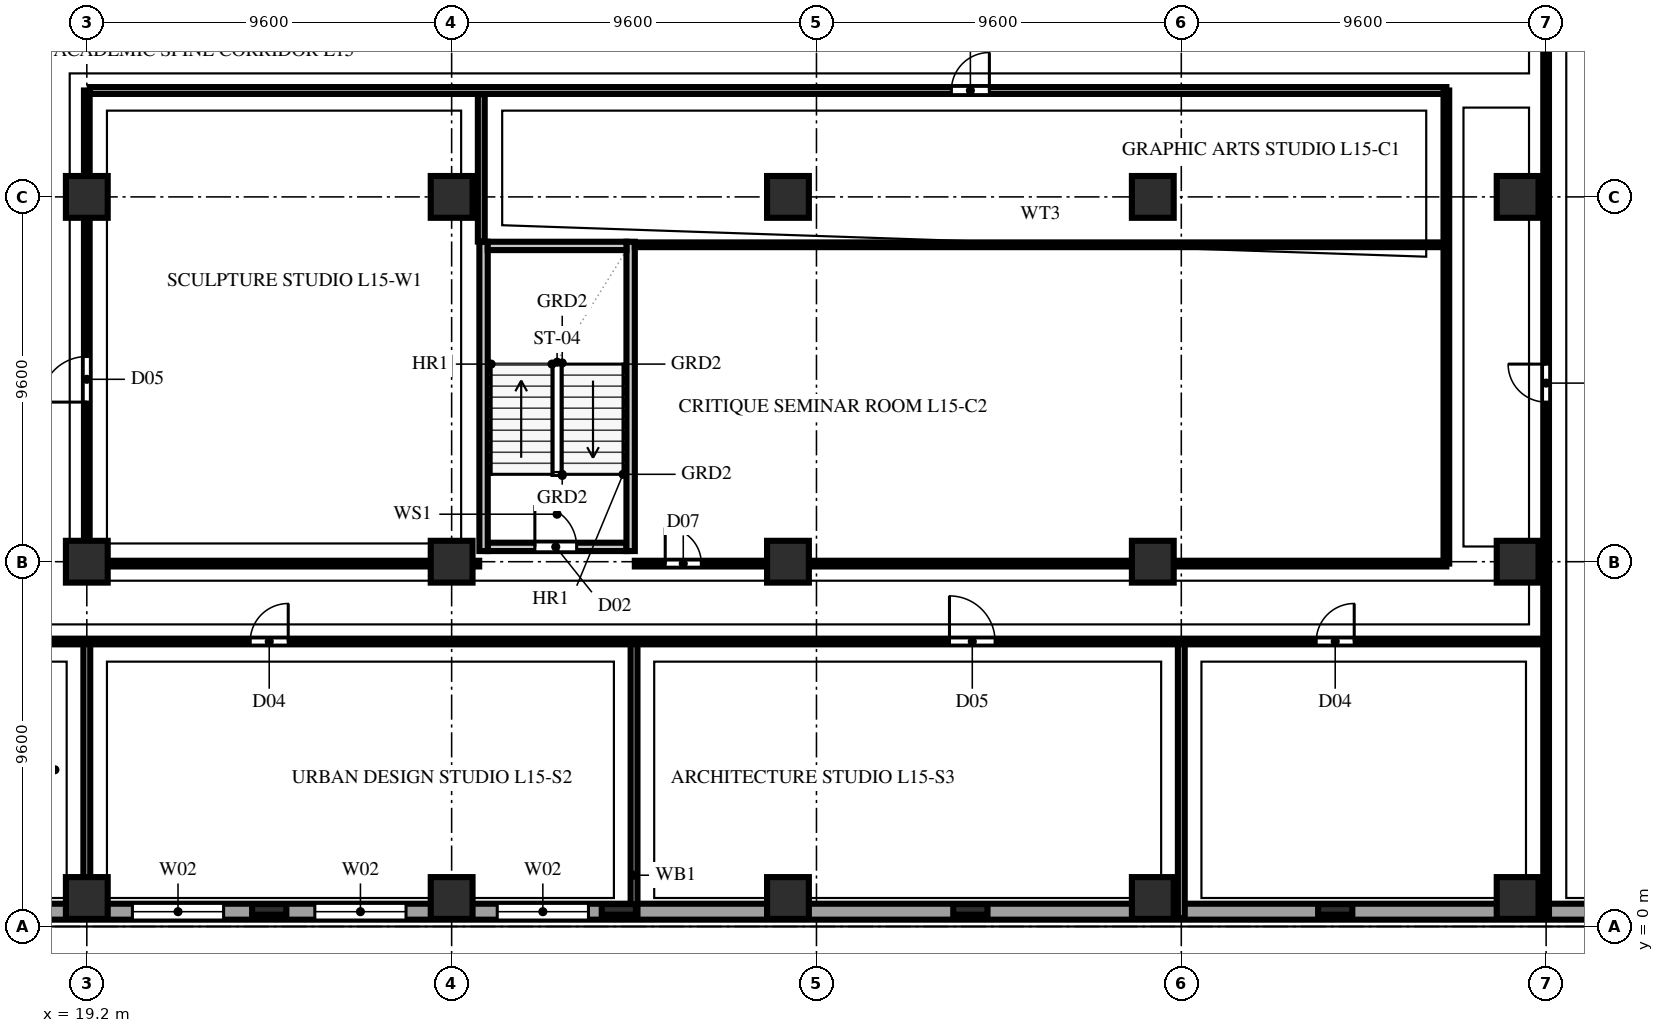
"""IFC4 building model, lengths in metres.
Left out: names, types, materials, properties, quantities, classifications, styles, units other than length and angle.
Written with IfcOpenShell. Run it as: python <this file> out.ifc"""

import sys

from ifc_helpers import new_model, si_unit, direction, frame, frame_2d, origin, origin_2d, place, context, subcontext, project, spatial, rectangle, extrude, element, fill, save


model = new_model("IFC4")
c1 = context("Model", 3, precision=1e-05, world=origin(), true_north=direction((0.0, 1.0)))
c2 = subcontext(c1, "Body", "Model", "MODEL_VIEW")
j1 = project(units=[si_unit("LENGTHUNIT", "METRE"), si_unit("PLANEANGLEUNIT", "RADIAN")], contexts=[c1])
p1 = place(None, origin())
s1 = spatial("IfcSite", under=j1, at=p1, CompositionType="ELEMENT")
p2 = place(p1, origin())
s2 = spatial("IfcBuilding", under=s1, at=p2, CompositionType="ELEMENT")
p3 = place(p2, frame((0.0, 0.0, 62.2)))
s3 = spatial("IfcBuildingStorey", under=s2, at=p3, CompositionType="ELEMENT", Elevation=62.2)
for number, where, z_axis, x_axis in (
    (1, (19.2, 0.75, 0.0), (0.0, 0.0, 1.0), (1.0, 0.0, 0.0)),
    (2, (19.2, 9.6, 0.0), (0.0, 0.0, 1.0), (1.0, 0.0, 0.0)),
    (3, (19.2, 19.2, 0.0), (0.0, 0.0, 1.0), (1.0, 0.0, 0.0)),
    (4, (28.8, 0.75, 0.0), (0.0, 0.0, 1.0), (1.0, 0.0, 0.0)),
    (5, (28.8, 9.6, 0.0), (0.0, 0.0, 1.0), (1.0, 0.0, 0.0)),
    (6, (28.8, 19.2, 0.0), (0.0, 0.0, 1.0), (1.0, 0.0, 0.0)),
    (7, (37.65, 0.75, 0.0), (0.0, 0.0, 1.0), (1.0, 0.0, 0.0)),
    (8, (37.65, 9.6, 0.0), (0.0, 0.0, 1.0), (1.0, 0.0, 0.0)),
    (9, (37.65, 19.2, 0.0), (0.0, 0.0, 1.0), (1.0, 0.0, 0.0)),
    (10, (47.25, 0.75, 0.0), (0.0, 0.0, 1.0), (1.0, 0.0, 0.0)),
    (11, (47.25, 9.6, 0.0), (0.0, 0.0, 1.0), (1.0, 0.0, 0.0)),
    (12, (47.25, 19.2, 0.0), (0.0, 0.0, 1.0), (1.0, 0.0, 0.0)),
    (13, (56.85, 0.75, 0.0), (0.0, 0.0, 1.0), (1.0, 0.0, 0.0)),
    (14, (56.85, 9.6, 0.0), (0.0, 0.0, 1.0), (1.0, 0.0, 0.0)),
    (15, (56.85, 19.2, 0.0), (0.0, 0.0, 1.0), (1.0, 0.0, 0.0)),
):
    element("IfcColumn", number, at=place(p3, frame(where, z_axis=z_axis, x_axis=x_axis)), inside=s3, PredefinedType="COLUMN", context=c2, shape_type="SweptSolid", body=[
        extrude(rectangle(XDim=1.1, YDim=1.1, at=origin_2d()), origin(), (0.0, 0.0, 1.0), 3.8),
    ])
for number, where, z_axis, x_axis in (
    (16, (24.0, 0.45, 0.0), (0.0, 0.0, 1.0), (1.0, 0.0, 0.0)),
    (17, (33.2, 0.45, 0.0), (0.0, 0.0, 1.0), (1.0, 0.0, 0.0)),
    (18, (42.45, 0.45, 0.0), (0.0, 0.0, 1.0), (1.0, 0.0, 0.0)),
    (19, (52.05, 0.45, 0.0), (0.0, 0.0, 1.0), (1.0, 0.0, 0.0)),
):
    element("IfcColumn", number, at=place(p3, frame(where, z_axis=z_axis, x_axis=x_axis)), inside=s3, PredefinedType="PILASTER", context=c2, shape_type="SweptSolid", body=[
        extrude(rectangle(XDim=0.9, YDim=0.28, at=origin_2d()), origin(), (0.0, 0.0, 1.0), 3.8),
    ])
p4 = place(p3, frame((1.84, 0.39, 0.0), z_axis=(0.0, 0.0, 1.0), x_axis=(1.0, 0.0, 0.0)))
e20 = element("IfcWall", 20, at=p4, inside=s3, PredefinedType="SOLIDWALL", context=c2, shape_type="SweptSolid", body=[
    extrude(rectangle(XDim=63.52, YDim=0.42, at=frame_2d((31.76, 0.0))), origin(), (0.0, 0.0, 1.0), 3.54),
])
p5 = place(p4, frame((4.16, 0.0, 0.85)))
e21 = element("IfcOpeningElement", 21, at=p5, cuts=e20, PredefinedType="OPENING", context=c2, shape_type="SweptSolid", body=[
    extrude(rectangle(XDim=2.4, YDim=1.85, at=frame_2d((1.2, 0.925))), frame((0.0, 0.222, 0.0), z_axis=(0.0, -1.0, 0.0), x_axis=(1.0, 0.0, 0.0)), (0.0, 0.0, 1.0), 0.444),
])
p6 = place(p4, frame((8.96, 0.0, 0.85)))
e22 = element("IfcOpeningElement", 22, at=p6, cuts=e20, PredefinedType="OPENING", context=c2, shape_type="SweptSolid", body=[
    extrude(rectangle(XDim=2.4, YDim=1.85, at=frame_2d((1.2, 0.925))), frame((0.0, 0.222, 0.0), z_axis=(0.0, -1.0, 0.0), x_axis=(1.0, 0.0, 0.0)), (0.0, 0.0, 1.0), 0.444),
])
p7 = place(p4, frame((13.76, 0.0, 0.85)))
e23 = element("IfcOpeningElement", 23, at=p7, cuts=e20, PredefinedType="OPENING", context=c2, shape_type="SweptSolid", body=[
    extrude(rectangle(XDim=2.4, YDim=1.85, at=frame_2d((1.2, 0.925))), frame((0.0, 0.222, 0.0), z_axis=(0.0, -1.0, 0.0), x_axis=(1.0, 0.0, 0.0)), (0.0, 0.0, 1.0), 0.444),
])
p8 = place(p4, frame((18.56, 0.0, 0.85)))
e24 = element("IfcOpeningElement", 24, at=p8, cuts=e20, PredefinedType="OPENING", context=c2, shape_type="SweptSolid", body=[
    extrude(rectangle(XDim=2.4, YDim=1.85, at=frame_2d((1.2, 0.925))), frame((0.0, 0.222, 0.0), z_axis=(0.0, -1.0, 0.0), x_axis=(1.0, 0.0, 0.0)), (0.0, 0.0, 1.0), 0.444),
])
p9 = place(p4, frame((23.36, 0.0, 0.85)))
e25 = element("IfcOpeningElement", 25, at=p9, cuts=e20, PredefinedType="OPENING", context=c2, shape_type="SweptSolid", body=[
    extrude(rectangle(XDim=2.4, YDim=1.85, at=frame_2d((1.2, 0.925))), frame((0.0, 0.222, 0.0), z_axis=(0.0, -1.0, 0.0), x_axis=(1.0, 0.0, 0.0)), (0.0, 0.0, 1.0), 0.444),
])
p10 = place(p4, frame((28.16, 0.0, 0.85)))
e26 = element("IfcOpeningElement", 26, at=p10, cuts=e20, PredefinedType="OPENING", context=c2, shape_type="SweptSolid", body=[
    extrude(rectangle(XDim=2.4, YDim=1.85, at=frame_2d((1.2, 0.925))), frame((0.0, 0.222, 0.0), z_axis=(0.0, -1.0, 0.0), x_axis=(1.0, 0.0, 0.0)), (0.0, 0.0, 1.0), 0.444),
])
p11 = place(p3, frame((29.75, 9.99, 0.0), z_axis=(0.0, 0.0, 1.0), x_axis=(1.0, 0.0, 0.0)))
e27 = element("IfcWall", 27, at=p11, inside=s3, PredefinedType="SOLIDWALL", context=c2, shape_type="SweptSolid", body=[
    extrude(rectangle(XDim=3.65, YDim=0.22, at=frame_2d((1.825, 0.0))), origin(), (0.0, 0.0, 1.0), 3.54),
])
p12 = place(p11, frame((1.24, 0.0, 0.0)))
e28 = element("IfcOpeningElement", 28, at=p12, cuts=e27, PredefinedType="OPENING", context=c2, shape_type="SweptSolid", body=[
    extrude(rectangle(XDim=1.1, YDim=2.2, at=frame_2d((0.55, 1.1))), frame((0.0, 0.122, 0.0), z_axis=(0.0, -1.0, 0.0), x_axis=(1.0, 0.0, 0.0)), (0.0, 0.0, 1.0), 0.244),
])
for number, where, z_axis, x_axis in (
    (29, (29.64, 9.88, 0.0), (0.0, 0.0, 1.0), (0.0, 1.0, 0.0)),
    (30, (33.51, 9.88, 0.0), (0.0, 0.0, 1.0), (0.0, 1.0, 0.0)),
):
    element("IfcWall", number, at=place(p3, frame(where, z_axis=z_axis, x_axis=x_axis)), inside=s3, PredefinedType="SOLIDWALL", context=c2, shape_type="SweptSolid", body=[
        extrude(rectangle(XDim=8.14, YDim=0.22, at=frame_2d((4.07, 0.0))), origin(), (0.0, 0.0, 1.0), 3.54),
    ])
p13 = place(p3, frame((29.75, 17.91, 0.0), z_axis=(0.0, 0.0, 1.0), x_axis=(1.0, 0.0, 0.0)))
e31 = element("IfcWall", 31, at=p13, inside=s3, PredefinedType="SOLIDWALL", context=c2, shape_type="SweptSolid", body=[
    extrude(rectangle(XDim=3.65, YDim=0.22, at=frame_2d((1.825, 0.0))), origin(), (0.0, 0.0, 1.0), 3.54),
])
p14 = place(p3, frame((19.2, 0.22, 0.0), z_axis=(0.0, 0.0, 1.0), x_axis=(0.0, 1.0, 0.0)))
e32 = element("IfcWall", 32, at=p14, inside=s3, PredefinedType="PARTITIONING", context=c2, shape_type="SweptSolid", body=[
    extrude(rectangle(XDim=0.53, YDim=0.18, at=frame_2d((0.265, 0.0))), origin(), (0.0, 0.0, 1.0), 3.54),
])
p15 = place(p3, frame((19.2, 0.75, 0.0), z_axis=(0.0, 0.0, 1.0), x_axis=(0.0, 1.0, 0.0)))
e33 = element("IfcWall", 33, at=p15, inside=s3, PredefinedType="PARTITIONING", context=c2, shape_type="SweptSolid", body=[
    extrude(rectangle(XDim=6.75, YDim=0.18, at=frame_2d((3.375, 0.0))), origin(), (0.0, 0.0, 1.0), 2.923),
])
for number, where, z_axis, x_axis in (
    (34, (33.6, 0.22, 0.0), (0.0, 0.0, 1.0), (0.0, 1.0, 0.0)),
    (35, (48.0, 0.22, 0.0), (0.0, 0.0, 1.0), (0.0, 1.0, 0.0)),
):
    element("IfcWall", number, at=place(p3, frame(where, z_axis=z_axis, x_axis=x_axis)), inside=s3, PredefinedType="PARTITIONING", context=c2, shape_type="SweptSolid", body=[
        extrude(rectangle(XDim=7.28, YDim=0.18, at=frame_2d((3.64, 0.0))), origin(), (0.0, 0.0, 1.0), 3.54),
    ])
p16 = place(p3, frame((0.22, 7.5, 0.0), z_axis=(0.0, 0.0, 1.0), x_axis=(1.0, 0.0, 0.0)))
e36 = element("IfcWall", 36, at=p16, inside=s3, PredefinedType="PARTITIONING", context=c2, shape_type="SweptSolid", body=[
    extrude(rectangle(XDim=57.38, YDim=0.15, at=frame_2d((28.69, 0.0))), origin(), (0.0, 0.0, 1.0), 3.54),
])
p17 = place(p16, frame((13.68, 0.0, 0.0)))
e37 = element("IfcOpeningElement", 37, at=p17, cuts=e36, PredefinedType="OPENING", context=c2, shape_type="SweptSolid", body=[
    extrude(rectangle(XDim=1.0, YDim=2.2, at=frame_2d((0.5, 1.1))), frame((0.0, 0.087, 0.0), z_axis=(0.0, -1.0, 0.0), x_axis=(1.0, 0.0, 0.0)), (0.0, 0.0, 1.0), 0.174),
])
p18 = place(p16, frame((23.28, 0.0, 0.0)))
e38 = element("IfcOpeningElement", 38, at=p18, cuts=e36, PredefinedType="OPENING", context=c2, shape_type="SweptSolid", body=[
    extrude(rectangle(XDim=1.0, YDim=2.2, at=frame_2d((0.5, 1.1))), frame((0.0, 0.087, 0.0), z_axis=(0.0, -1.0, 0.0), x_axis=(1.0, 0.0, 0.0)), (0.0, 0.0, 1.0), 0.174),
])
p19 = place(p16, frame((41.68, 0.0, 0.0)))
e39 = element("IfcOpeningElement", 39, at=p19, cuts=e36, PredefinedType="OPENING", context=c2, shape_type="SweptSolid", body=[
    extrude(rectangle(XDim=1.2, YDim=2.2, at=frame_2d((0.6, 1.1))), frame((0.0, 0.087, 0.0), z_axis=(0.0, -1.0, 0.0), x_axis=(1.0, 0.0, 0.0)), (0.0, 0.0, 1.0), 0.174),
])
p20 = place(p16, frame((51.33, 0.0, 0.0)))
e40 = element("IfcOpeningElement", 40, at=p20, cuts=e36, PredefinedType="OPENING", context=c2, shape_type="SweptSolid", body=[
    extrude(rectangle(XDim=1.0, YDim=2.2, at=frame_2d((0.5, 1.1))), frame((0.0, 0.087, 0.0), z_axis=(0.0, -1.0, 0.0), x_axis=(1.0, 0.0, 0.0)), (0.0, 0.0, 1.0), 0.174),
])
p21 = place(p3, frame((57.6, 0.22, 0.0), z_axis=(0.0, 0.0, 1.0), x_axis=(0.0, 1.0, 0.0)))
e41 = element("IfcWall", 41, at=p21, inside=s3, PredefinedType="PARTITIONING", context=c2, shape_type="SweptSolid", body=[
    extrude(rectangle(XDim=37.96, YDim=0.15, at=frame_2d((18.98, 0.0))), origin(), (0.0, 0.0, 1.0), 3.54),
])
p22 = place(p21, frame((13.58, 0.0, 0.0)))
e42 = element("IfcOpeningElement", 42, at=p22, cuts=e41, PredefinedType="OPENING", context=c2, shape_type="SweptSolid", body=[
    extrude(rectangle(XDim=1.0, YDim=2.2, at=frame_2d((0.5, 1.1))), frame((0.0, 0.087, 0.0), z_axis=(0.0, -1.0, 0.0), x_axis=(1.0, 0.0, 0.0)), (0.0, 0.0, 1.0), 0.174),
])
p23 = place(p3, frame((19.2, 9.55, 0.0), z_axis=(0.0, 0.0, 1.0), x_axis=(0.0, 1.0, 0.0)))
e43 = element("IfcWall", 43, at=p23, inside=s3, PredefinedType="PARTITIONING", context=c2, shape_type="SweptSolid", body=[
    extrude(rectangle(XDim=12.45, YDim=0.15, at=frame_2d((6.225, 0.0))), origin(), (0.0, 0.0, 1.0), 2.923),
])
p24 = place(p23, frame((4.25, 0.0, 0.0)))
e44 = element("IfcOpeningElement", 44, at=p24, cuts=e43, PredefinedType="OPENING", context=c2, shape_type="SweptSolid", body=[
    extrude(rectangle(XDim=1.2, YDim=2.2, at=frame_2d((0.6, 1.1))), frame((0.0, 0.087, 0.0), z_axis=(0.0, -1.0, 0.0), x_axis=(1.0, 0.0, 0.0)), (0.0, 0.0, 1.0), 0.174),
])
p25 = place(p3, frame((29.58, 18.025, 0.0), z_axis=(0.0, 0.0, 1.0), x_axis=(0.0, 1.0, 0.0)))
e45 = element("IfcWall", 45, at=p25, inside=s3, PredefinedType="PARTITIONING", context=c2, shape_type="SweptSolid", body=[
    extrude(rectangle(XDim=3.88, YDim=0.18, at=frame_2d((1.94, 0.0))), origin(), (0.0, 0.0, 1.0), 3.54),
])
p26 = place(p3, frame((19.28, 22.0, 0.0), z_axis=(0.0, 0.0, 1.0), x_axis=(1.0, 0.0, 0.0)))
e46 = element("IfcWall", 46, at=p26, inside=s3, PredefinedType="PARTITIONING", context=c2, shape_type="SweptSolid", body=[
    extrude(rectangle(XDim=35.695, YDim=0.18, at=frame_2d((17.848, 0.0))), origin(), (0.0, 0.0, 1.0), 3.54),
])
p27 = place(p26, frame((22.67, 0.0, 0.0)))
e47 = element("IfcOpeningElement", 47, at=p27, cuts=e46, PredefinedType="OPENING", context=c2, shape_type="SweptSolid", body=[
    extrude(rectangle(XDim=1.0, YDim=2.2, at=frame_2d((0.5, 1.1))), frame((0.0, 0.102, 0.0), z_axis=(0.0, -1.0, 0.0), x_axis=(1.0, 0.0, 0.0)), (0.0, 0.0, 1.0), 0.204),
])
p28 = place(p3, frame((19.28, 9.55, 0.0), z_axis=(0.0, 0.0, 1.0), x_axis=(1.0, 0.0, 0.0)))
e48 = element("IfcWall", 48, at=p28, inside=s3, PredefinedType="PARTITIONING", context=c2, shape_type="SweptSolid", body=[
    extrude(rectangle(XDim=10.245, YDim=0.15, at=frame_2d((5.123, 0.0))), origin(), (0.0, 0.0, 1.0), 2.923),
])
p29 = place(p3, frame((33.62, 17.94, 0.0), z_axis=(0.0, 0.0, 1.0), x_axis=(1.0, 0.0, 0.0)))
e49 = element("IfcWall", 49, at=p29, inside=s3, PredefinedType="PARTITIONING", context=c2, shape_type="SweptSolid", body=[
    extrude(rectangle(XDim=21.355, YDim=0.125, at=frame_2d((10.677, 0.0))), origin(), (0.0, 0.0, 1.0), 3.54),
])
p30 = place(p3, frame((33.62, 9.55, 0.0), z_axis=(0.0, 0.0, 1.0), x_axis=(1.0, 0.0, 0.0)))
e50 = element("IfcWall", 50, at=p30, inside=s3, PredefinedType="PARTITIONING", context=c2, shape_type="SweptSolid", body=[
    extrude(rectangle(XDim=21.355, YDim=0.15, at=frame_2d((10.677, 0.0))), origin(), (0.0, 0.0, 1.0), 2.923),
])
p31 = place(p30, frame((0.8, 0.0, 0.0)))
e51 = element("IfcOpeningElement", 51, at=p31, cuts=e50, PredefinedType="OPENING", context=c2, shape_type="SweptSolid", body=[
    extrude(rectangle(XDim=0.95, YDim=2.15, at=frame_2d((0.475, 1.075))), frame((0.0, 0.087, 0.0), z_axis=(0.0, -1.0, 0.0), x_axis=(1.0, 0.0, 0.0)), (0.0, 0.0, 1.0), 0.174),
])
p32 = place(p3, frame((54.975, 9.55, 0.0), z_axis=(0.0, 0.0, 1.0), x_axis=(0.0, 1.0, 0.0)))
e52 = element("IfcWall", 52, at=p32, inside=s3, PredefinedType="PARTITIONING", context=c2, shape_type="SweptSolid", body=[
    extrude(rectangle(XDim=12.45, YDim=0.15, at=frame_2d((6.225, 0.0))), origin(), (0.0, 0.0, 1.0), 3.54),
])
p33 = place(p8, origin())
e53 = element("IfcWindow", 53, at=p33, inside=s3, PartitioningType="TRIPLE_PANEL_VERTICAL", PredefinedType="WINDOW", context=c2, shape_type="SweptSolid", body=[
    extrude(rectangle(XDim=2.4, YDim=1.85, at=frame_2d((1.2, 0.925))), frame((0.0, 0.11, 0.0), z_axis=(0.0, -1.0, 0.0), x_axis=(1.0, 0.0, 0.0)), (0.0, 0.0, 1.0), 0.06),
])
fill(e24, e53)
p34 = place(p9, origin())
e54 = element("IfcWindow", 54, at=p34, inside=s3, PartitioningType="TRIPLE_PANEL_VERTICAL", PredefinedType="WINDOW", context=c2, shape_type="SweptSolid", body=[
    extrude(rectangle(XDim=2.4, YDim=1.85, at=frame_2d((1.2, 0.925))), frame((0.0, 0.11, 0.0), z_axis=(0.0, -1.0, 0.0), x_axis=(1.0, 0.0, 0.0)), (0.0, 0.0, 1.0), 0.06),
])
fill(e25, e54)
p35 = place(p10, origin())
e55 = element("IfcWindow", 55, at=p35, inside=s3, PartitioningType="TRIPLE_PANEL_VERTICAL", PredefinedType="WINDOW", context=c2, shape_type="SweptSolid", body=[
    extrude(rectangle(XDim=2.4, YDim=1.85, at=frame_2d((1.2, 0.925))), frame((0.0, 0.11, 0.0), z_axis=(0.0, -1.0, 0.0), x_axis=(1.0, 0.0, 0.0)), (0.0, 0.0, 1.0), 0.06),
])
fill(e26, e55)
p36 = place(p12, origin())
e56 = element("IfcDoor", 56, at=p36, inside=s3, OperationType="SINGLE_SWING_LEFT", PredefinedType="DOOR", context=c2, shape_type="SweptSolid", body=[
    extrude(rectangle(XDim=1.1, YDim=2.2, at=frame_2d((0.55, 1.1))), frame((0.0, 0.025, 0.0), z_axis=(0.0, -1.0, 0.0), x_axis=(1.0, 0.0, 0.0)), (0.0, 0.0, 1.0), 0.05),
])
fill(e28, e56)
p37 = place(p18, origin())
e57 = element("IfcDoor", 57, at=p37, inside=s3, OperationType="SINGLE_SWING_RIGHT", PredefinedType="DOOR", context=c2, shape_type="SweptSolid", body=[
    extrude(rectangle(XDim=1.0, YDim=2.2, at=frame_2d((0.5, 1.1))), frame((0.0, 0.025, 0.0), z_axis=(0.0, -1.0, 0.0), x_axis=(1.0, 0.0, 0.0)), (0.0, 0.0, 1.0), 0.05),
])
fill(e38, e57)
p38 = place(p19, origin())
e58 = element("IfcDoor", 58, at=p38, inside=s3, OperationType="SINGLE_SWING_LEFT", PredefinedType="DOOR", context=c2, shape_type="SweptSolid", body=[
    extrude(rectangle(XDim=1.2, YDim=2.2, at=frame_2d((0.6, 1.1))), frame((0.0, 0.025, 0.0), z_axis=(0.0, -1.0, 0.0), x_axis=(1.0, 0.0, 0.0)), (0.0, 0.0, 1.0), 0.05),
])
fill(e39, e58)
p39 = place(p20, origin())
e59 = element("IfcDoor", 59, at=p39, inside=s3, OperationType="SINGLE_SWING_RIGHT", PredefinedType="DOOR", context=c2, shape_type="SweptSolid", body=[
    extrude(rectangle(XDim=1.0, YDim=2.2, at=frame_2d((0.5, 1.1))), frame((0.0, 0.025, 0.0), z_axis=(0.0, -1.0, 0.0), x_axis=(1.0, 0.0, 0.0)), (0.0, 0.0, 1.0), 0.05),
])
fill(e40, e59)
p40 = place(p22, origin())
e60 = element("IfcDoor", 60, at=p40, inside=s3, OperationType="SINGLE_SWING_RIGHT", PredefinedType="DOOR", context=c2, shape_type="SweptSolid", body=[
    extrude(rectangle(XDim=1.0, YDim=2.2, at=frame_2d((0.5, 1.1))), frame((0.0, 0.025, 0.0), z_axis=(0.0, -1.0, 0.0), x_axis=(1.0, 0.0, 0.0)), (0.0, 0.0, 1.0), 0.05),
])
fill(e42, e60)
p41 = place(p24, origin())
e61 = element("IfcDoor", 61, at=p41, inside=s3, OperationType="SINGLE_SWING_LEFT", PredefinedType="DOOR", context=c2, shape_type="SweptSolid", body=[
    extrude(rectangle(XDim=1.2, YDim=2.2, at=frame_2d((0.6, 1.1))), frame((0.0, 0.025, 0.0), z_axis=(0.0, -1.0, 0.0), x_axis=(1.0, 0.0, 0.0)), (0.0, 0.0, 1.0), 0.05),
])
fill(e44, e61)
p42 = place(p27, origin())
e62 = element("IfcDoor", 62, at=p42, inside=s3, OperationType="SINGLE_SWING_RIGHT", PredefinedType="DOOR", context=c2, shape_type="SweptSolid", body=[
    extrude(rectangle(XDim=1.0, YDim=2.2, at=frame_2d((0.5, 1.1))), frame((0.0, 0.025, 0.0), z_axis=(0.0, -1.0, 0.0), x_axis=(1.0, 0.0, 0.0)), (0.0, 0.0, 1.0), 0.05),
])
fill(e47, e62)
p43 = place(p31, origin())
e63 = element("IfcDoor", 63, at=p43, inside=s3, OperationType="SINGLE_SWING_LEFT", PredefinedType="DOOR", context=c2, shape_type="SweptSolid", body=[
    extrude(rectangle(XDim=0.95, YDim=2.15, at=frame_2d((0.475, 1.075))), frame((0.0, 0.025, 0.0), z_axis=(0.0, -1.0, 0.0), x_axis=(1.0, 0.0, 0.0)), (0.0, 0.0, 1.0), 0.05),
])
fill(e51, e63)
save(model, sys.argv[1])
